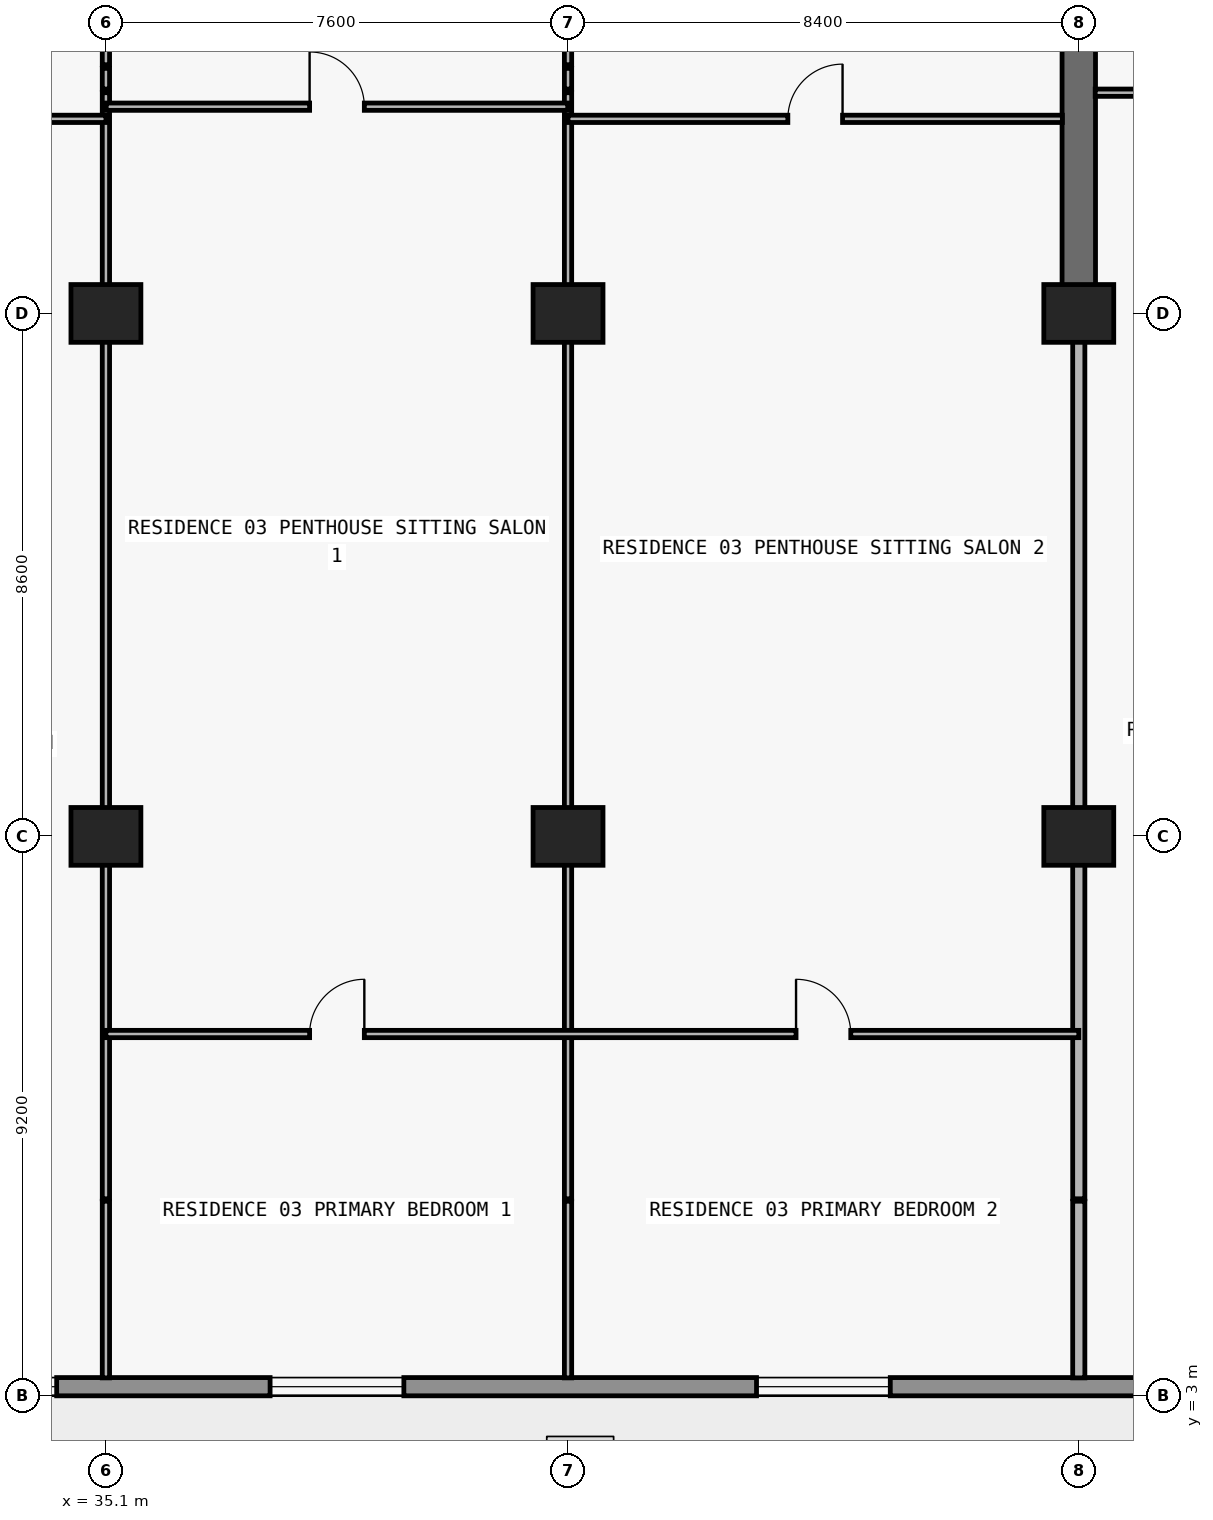
"""IFC4 building model, lengths in metres.
Left out: names, types, materials, properties, quantities, classifications, styles, units other than length and angle.
Written with IfcOpenShell. Run it as: python <this file> out.ifc"""

import sys

from ifc_helpers import new_model, si_unit, direction, frame, frame_2d, origin, origin_2d, place, context, subcontext, project, spatial, rectangle, extrude, element, fill, save


model = new_model("IFC4")
c1 = context("Model", 3, precision=1e-05, world=origin(), true_north=direction((0.0, 1.0)))
c2 = subcontext(c1, "Body", "Model", "MODEL_VIEW")
j1 = project(units=[si_unit("LENGTHUNIT", "METRE"), si_unit("PLANEANGLEUNIT", "RADIAN")], contexts=[c1])
p1 = place(None, origin())
s1 = spatial("IfcSite", under=j1, at=p1, CompositionType="ELEMENT")
p2 = place(p1, origin())
s2 = spatial("IfcBuilding", under=s1, at=p2, CompositionType="ELEMENT")
p3 = place(p2, frame((0.0, 0.0, 53.1)))
s3 = spatial("IfcBuildingStorey", under=s2, at=p3, CompositionType="ELEMENT", Elevation=53.1)
for number, where, z_axis, x_axis in (
    (1, (35.1, 12.2, 0.0), (0.0, 0.0, 1.0), (1.0, 0.0, 0.0)),
    (2, (42.7, 12.2, 0.0), (0.0, 0.0, 1.0), (1.0, 0.0, 0.0)),
    (3, (51.1, 12.2, 0.0), (0.0, 0.0, 1.0), (1.0, 0.0, 0.0)),
    (4, (35.1, 20.8, 0.0), (0.0, 0.0, 1.0), (1.0, 0.0, 0.0)),
    (5, (42.7, 20.8, 0.0), (0.0, 0.0, 1.0), (1.0, 0.0, 0.0)),
    (6, (51.1, 20.8, 0.0), (0.0, 0.0, 1.0), (1.0, 0.0, 0.0)),
):
    element("IfcColumn", number, at=place(p3, frame(where, z_axis=z_axis, x_axis=x_axis)), inside=s3, PredefinedType="COLUMN", context=c2, shape_type="SweptSolid", body=[
        extrude(rectangle(XDim=1.15, YDim=0.95, at=origin_2d()), origin(), (0.0, 0.0, 1.0), 3.05),
    ])
p4 = place(p3, frame((51.1, 20.8, 0.0), z_axis=(0.0, 0.0, 1.0), x_axis=(0.0, 1.0, 0.0)))
e7 = element("IfcWall", 7, at=p4, inside=s3, PredefinedType="SHEAR", context=c2, shape_type="SweptSolid", body=[
    extrude(rectangle(XDim=8.6, YDim=0.55, at=frame_2d((4.3, 0.0))), origin(), (0.0, 0.0, 1.0), 3.05),
])
p5 = place(p3, frame((72.7, 3.15, 0.0), z_axis=(0.0, 0.0, 1.0), x_axis=(-1.0, 0.0, 0.0)))
e8 = element("IfcWall", 8, at=p5, inside=s3, PredefinedType="STANDARD", context=c2, shape_type="SweptSolid", body=[
    extrude(rectangle(XDim=67.6, YDim=0.3, at=frame_2d((33.8, 0.0))), origin(), (0.0, 0.0, 1.0), 3.05),
])
p6 = place(p5, frame((59.826, 0.0, 0.0)))
e9 = element("IfcOpeningElement", 9, at=p6, cuts=e8, PredefinedType="OPENING", context=c2, shape_type="SweptSolid", body=[
    extrude(rectangle(XDim=2.0, YDim=2.3, at=frame_2d((1.0, 1.15))), frame((0.0, 0.16, 0.0), z_axis=(0.0, -1.0, 0.0), x_axis=(1.0, 0.0, 0.0)), (0.0, 0.0, 1.0), 0.32),
])
p7 = place(p5, frame((55.526, 0.0, 0.85)))
e10 = element("IfcOpeningElement", 10, at=p7, cuts=e8, PredefinedType="OPENING", context=c2, shape_type="SweptSolid", body=[
    extrude(rectangle(XDim=2.2, YDim=1.55, at=frame_2d((1.1, 0.775))), frame((0.0, 0.16, 0.0), z_axis=(0.0, -1.0, 0.0), x_axis=(1.0, 0.0, 0.0)), (0.0, 0.0, 1.0), 0.32),
])
p8 = place(p5, frame((51.09, 0.0, 0.0)))
e11 = element("IfcOpeningElement", 11, at=p8, cuts=e8, PredefinedType="OPENING", context=c2, shape_type="SweptSolid", body=[
    extrude(rectangle(XDim=2.0, YDim=2.3, at=frame_2d((1.0, 1.15))), frame((0.0, 0.16, 0.0), z_axis=(0.0, -1.0, 0.0), x_axis=(1.0, 0.0, 0.0)), (0.0, 0.0, 1.0), 0.32),
])
p9 = place(p5, frame((46.99, 0.0, 0.85)))
e12 = element("IfcOpeningElement", 12, at=p9, cuts=e8, PredefinedType="OPENING", context=c2, shape_type="SweptSolid", body=[
    extrude(rectangle(XDim=1.8, YDim=1.55, at=frame_2d((0.9, 0.775))), frame((0.0, 0.16, 0.0), z_axis=(0.0, -1.0, 0.0), x_axis=(1.0, 0.0, 0.0)), (0.0, 0.0, 1.0), 0.32),
])
p10 = place(p5, frame((43.09, 0.0, 0.0)))
e13 = element("IfcOpeningElement", 13, at=p10, cuts=e8, PredefinedType="OPENING", context=c2, shape_type="SweptSolid", body=[
    extrude(rectangle(XDim=2.0, YDim=2.3, at=frame_2d((1.0, 1.15))), frame((0.0, 0.16, 0.0), z_axis=(0.0, -1.0, 0.0), x_axis=(1.0, 0.0, 0.0)), (0.0, 0.0, 1.0), 0.32),
])
p11 = place(p5, frame((38.41, 0.0, 0.65)))
e14 = element("IfcOpeningElement", 14, at=p11, cuts=e8, PredefinedType="OPENING", context=c2, shape_type="SweptSolid", body=[
    extrude(rectangle(XDim=2.6, YDim=1.85, at=frame_2d((1.3, 0.925))), frame((0.0, 0.16, 0.0), z_axis=(0.0, -1.0, 0.0), x_axis=(1.0, 0.0, 0.0)), (0.0, 0.0, 1.0), 0.32),
])
p12 = place(p5, frame((32.7, 0.0, 0.85)))
e15 = element("IfcOpeningElement", 15, at=p12, cuts=e8, PredefinedType="OPENING", context=c2, shape_type="SweptSolid", body=[
    extrude(rectangle(XDim=2.2, YDim=1.55, at=frame_2d((1.1, 0.775))), frame((0.0, 0.16, 0.0), z_axis=(0.0, -1.0, 0.0), x_axis=(1.0, 0.0, 0.0)), (0.0, 0.0, 1.0), 0.32),
])
p13 = place(p5, frame((24.7, 0.0, 0.85)))
e16 = element("IfcOpeningElement", 16, at=p13, cuts=e8, PredefinedType="OPENING", context=c2, shape_type="SweptSolid", body=[
    extrude(rectangle(XDim=2.2, YDim=1.55, at=frame_2d((1.1, 0.775))), frame((0.0, 0.16, 0.0), z_axis=(0.0, -1.0, 0.0), x_axis=(1.0, 0.0, 0.0)), (0.0, 0.0, 1.0), 0.32),
])
p14 = place(p5, frame((18.29, 0.0, 0.0)))
e17 = element("IfcOpeningElement", 17, at=p14, cuts=e8, PredefinedType="OPENING", context=c2, shape_type="SweptSolid", body=[
    extrude(rectangle(XDim=2.0, YDim=2.3, at=frame_2d((1.0, 1.15))), frame((0.0, 0.16, 0.0), z_axis=(0.0, -1.0, 0.0), x_axis=(1.0, 0.0, 0.0)), (0.0, 0.0, 1.0), 0.32),
])
p15 = place(p5, frame((14.19, 0.0, 0.85)))
e18 = element("IfcOpeningElement", 18, at=p15, cuts=e8, PredefinedType="OPENING", context=c2, shape_type="SweptSolid", body=[
    extrude(rectangle(XDim=1.8, YDim=1.55, at=frame_2d((0.9, 0.775))), frame((0.0, 0.16, 0.0), z_axis=(0.0, -1.0, 0.0), x_axis=(1.0, 0.0, 0.0)), (0.0, 0.0, 1.0), 0.32),
])
p16 = place(p5, frame((10.226, 0.0, 0.0)))
e19 = element("IfcOpeningElement", 19, at=p16, cuts=e8, PredefinedType="OPENING", context=c2, shape_type="SweptSolid", body=[
    extrude(rectangle(XDim=2.0, YDim=2.3, at=frame_2d((1.0, 1.15))), frame((0.0, 0.16, 0.0), z_axis=(0.0, -1.0, 0.0), x_axis=(1.0, 0.0, 0.0)), (0.0, 0.0, 1.0), 0.32),
])
p17 = place(p5, frame((5.926, 0.0, 0.85)))
e20 = element("IfcOpeningElement", 20, at=p17, cuts=e8, PredefinedType="OPENING", context=c2, shape_type="SweptSolid", body=[
    extrude(rectangle(XDim=2.2, YDim=1.55, at=frame_2d((1.1, 0.775))), frame((0.0, 0.16, 0.0), z_axis=(0.0, -1.0, 0.0), x_axis=(1.0, 0.0, 0.0)), (0.0, 0.0, 1.0), 0.32),
])
p18 = place(p3, frame((35.1, 3.295, 0.0), z_axis=(0.0, 0.0, 1.0), x_axis=(0.0, 1.0, 0.0)))
e21 = element("IfcWall", 21, at=p18, inside=s3, PredefinedType="PARTITIONING", context=c2, shape_type="SweptSolid", body=[
    extrude(rectangle(XDim=2.905, YDim=0.12, at=frame_2d((1.453, 0.0))), origin(), (0.0, 0.0, 1.0), 3.05),
])
p19 = place(p3, frame((35.1, 6.24, 0.0), z_axis=(0.0, 0.0, 1.0), x_axis=(0.0, 1.0, 0.0)))
e22 = element("IfcWall", 22, at=p19, inside=s3, PredefinedType="PARTITIONING", context=c2, shape_type="SweptSolid", body=[
    extrude(rectangle(XDim=18.19, YDim=0.12, at=frame_2d((9.095, 0.0))), origin(), (0.0, 0.0, 1.0), 2.11),
])
p20 = place(p3, frame((35.1, 24.49, 0.0), z_axis=(0.0, 0.0, 1.0), x_axis=(0.0, 1.0, 0.0)))
e23 = element("IfcWall", 23, at=p20, inside=s3, PredefinedType="PARTITIONING", context=c2, shape_type="SweptSolid", body=[
    extrude(rectangle(XDim=0.34, YDim=0.12, at=frame_2d((0.17, 0.0))), origin(), (0.0, 0.0, 1.0), 2.11),
])
p21 = place(p3, frame((35.1, 24.89, 0.0), z_axis=(0.0, 0.0, 1.0), x_axis=(0.0, 1.0, 0.0)))
e24 = element("IfcWall", 24, at=p21, inside=s3, PredefinedType="PARTITIONING", context=c2, shape_type="SweptSolid", body=[
    extrude(rectangle(XDim=4.69, YDim=0.12, at=frame_2d((2.345, 0.0))), origin(), (0.0, 0.0, 1.0), 2.11),
])
p22 = place(p21, frame((1.405, 0.0, 0.0)))
e25 = element("IfcOpeningElement", 25, at=p22, cuts=e24, PredefinedType="OPENING", context=c2, shape_type="SweptSolid", body=[
    extrude(rectangle(XDim=0.9, YDim=2.06, at=frame_2d((0.45, 1.03))), frame((0.0, 0.07, 0.0), z_axis=(0.0, -1.0, 0.0), x_axis=(1.0, 0.0, 0.0)), (0.0, 0.0, 1.0), 0.14),
])
p23 = place(p3, frame((42.7, 3.295, 0.0), z_axis=(0.0, 0.0, 1.0), x_axis=(0.0, 1.0, 0.0)))
e26 = element("IfcWall", 26, at=p23, inside=s3, PredefinedType="PARTITIONING", context=c2, shape_type="SweptSolid", body=[
    extrude(rectangle(XDim=2.905, YDim=0.12, at=frame_2d((1.453, 0.0))), origin(), (0.0, 0.0, 1.0), 3.05),
])
p24 = place(p3, frame((42.7, 6.24, 0.0), z_axis=(0.0, 0.0, 1.0), x_axis=(0.0, 1.0, 0.0)))
e27 = element("IfcWall", 27, at=p24, inside=s3, PredefinedType="PARTITIONING", context=c2, shape_type="SweptSolid", body=[
    extrude(rectangle(XDim=18.19, YDim=0.12, at=frame_2d((9.095, 0.0))), origin(), (0.0, 0.0, 1.0), 2.11),
])
p25 = place(p3, frame((42.7, 24.49, 0.0), z_axis=(0.0, 0.0, 1.0), x_axis=(0.0, 1.0, 0.0)))
e28 = element("IfcWall", 28, at=p25, inside=s3, PredefinedType="PARTITIONING", context=c2, shape_type="SweptSolid", body=[
    extrude(rectangle(XDim=0.34, YDim=0.12, at=frame_2d((0.17, 0.0))), origin(), (0.0, 0.0, 1.0), 2.11),
])
p26 = place(p3, frame((42.7, 24.89, 0.0), z_axis=(0.0, 0.0, 1.0), x_axis=(0.0, 1.0, 0.0)))
e29 = element("IfcWall", 29, at=p26, inside=s3, PredefinedType="PARTITIONING", context=c2, shape_type="SweptSolid", body=[
    extrude(rectangle(XDim=4.69, YDim=0.12, at=frame_2d((2.345, 0.0))), origin(), (0.0, 0.0, 1.0), 2.11),
])
p27 = place(p26, frame((1.405, 0.0, 0.0)))
e30 = element("IfcOpeningElement", 30, at=p27, cuts=e29, PredefinedType="OPENING", context=c2, shape_type="SweptSolid", body=[
    extrude(rectangle(XDim=0.9, YDim=2.06, at=frame_2d((0.45, 1.03))), frame((0.0, 0.07, 0.0), z_axis=(0.0, -1.0, 0.0), x_axis=(1.0, 0.0, 0.0)), (0.0, 0.0, 1.0), 0.14),
])
p28 = place(p3, frame((51.1, 3.295, 0.0), z_axis=(0.0, 0.0, 1.0), x_axis=(0.0, 1.0, 0.0)))
e31 = element("IfcWall", 31, at=p28, inside=s3, PredefinedType="PARTITIONING", context=c2, shape_type="SweptSolid", body=[
    extrude(rectangle(XDim=2.905, YDim=0.2, at=frame_2d((1.453, 0.0))), origin(), (0.0, 0.0, 1.0), 3.05),
])
p29 = place(p3, frame((51.1, 6.24, 0.0), z_axis=(0.0, 0.0, 1.0), x_axis=(0.0, 1.0, 0.0)))
e32 = element("IfcWall", 32, at=p29, inside=s3, PredefinedType="PARTITIONING", context=c2, shape_type="SweptSolid", body=[
    extrude(rectangle(XDim=14.555, YDim=0.2, at=frame_2d((7.277, 0.0))), origin(), (0.0, 0.0, 1.0), 2.11),
])
p30 = place(p3, frame((35.1, 8.95, 0.0), z_axis=(0.0, 0.0, 1.0), x_axis=(1.0, 0.0, 0.0)))
e33 = element("IfcWall", 33, at=p30, inside=s3, PredefinedType="PARTITIONING", context=c2, shape_type="SweptSolid", body=[
    extrude(rectangle(XDim=16.0, YDim=0.12, at=frame_2d((8.0, 0.0))), origin(), (0.0, 0.0, 1.0), 3.05),
])
p31 = place(p30, frame((3.35, 0.0, 0.0)))
e34 = element("IfcOpeningElement", 34, at=p31, cuts=e33, PredefinedType="OPENING", context=c2, shape_type="SweptSolid", body=[
    extrude(rectangle(XDim=0.9, YDim=2.15, at=frame_2d((0.45, 1.075))), frame((0.0, 0.07, 0.0), z_axis=(0.0, -1.0, 0.0), x_axis=(1.0, 0.0, 0.0)), (0.0, 0.0, 1.0), 0.14),
])
p32 = place(p30, frame((11.35, 0.0, 0.0)))
e35 = element("IfcOpeningElement", 35, at=p32, cuts=e33, PredefinedType="OPENING", context=c2, shape_type="SweptSolid", body=[
    extrude(rectangle(XDim=0.9, YDim=2.15, at=frame_2d((0.45, 1.075))), frame((0.0, 0.07, 0.0), z_axis=(0.0, -1.0, 0.0), x_axis=(1.0, 0.0, 0.0)), (0.0, 0.0, 1.0), 0.14),
])
p33 = place(p3, frame((26.97, 24.0, 0.0), z_axis=(0.0, 0.0, 1.0), x_axis=(1.0, 0.0, 0.0)))
e36 = element("IfcWall", 36, at=p33, inside=s3, PredefinedType="PARTITIONING", context=c2, shape_type="SweptSolid", body=[
    extrude(rectangle(XDim=8.13, YDim=0.12, at=frame_2d((4.065, 0.0))), origin(), (0.0, 0.0, 1.0), 3.05),
])
p34 = place(p33, frame((1.305, 0.0, 0.0)))
e37 = element("IfcOpeningElement", 37, at=p34, cuts=e36, PredefinedType="OPENING", context=c2, shape_type="SweptSolid", body=[
    extrude(rectangle(XDim=0.9, YDim=2.15, at=frame_2d((0.45, 1.075))), frame((0.0, 0.07, 0.0), z_axis=(0.0, -1.0, 0.0), x_axis=(1.0, 0.0, 0.0)), (0.0, 0.0, 1.0), 0.14),
])
p35 = place(p3, frame((42.7, 24.0, 0.0), z_axis=(0.0, 0.0, 1.0), x_axis=(1.0, 0.0, 0.0)))
e38 = element("IfcWall", 38, at=p35, inside=s3, PredefinedType="PARTITIONING", context=c2, shape_type="SweptSolid", body=[
    extrude(rectangle(XDim=8.13, YDim=0.12, at=frame_2d((4.065, 0.0))), origin(), (0.0, 0.0, 1.0), 3.05),
])
p36 = place(p35, frame((3.615, 0.0, 0.0)))
e39 = element("IfcOpeningElement", 39, at=p36, cuts=e38, PredefinedType="OPENING", context=c2, shape_type="SweptSolid", body=[
    extrude(rectangle(XDim=0.9, YDim=2.15, at=frame_2d((0.45, 1.075))), frame((0.0, 0.07, 0.0), z_axis=(0.0, -1.0, 0.0), x_axis=(1.0, 0.0, 0.0)), (0.0, 0.0, 1.0), 0.14),
])
p37 = place(p3, frame((35.105, 24.2, 0.0), z_axis=(0.0, 0.0, 1.0), x_axis=(1.0, 0.0, 0.0)))
e40 = element("IfcWall", 40, at=p37, inside=s3, PredefinedType="PARTITIONING", context=c2, shape_type="SweptSolid", body=[
    extrude(rectangle(XDim=7.59, YDim=0.12, at=frame_2d((3.795, 0.0))), origin(), (0.0, 0.0, 1.0), 3.05),
])
p38 = place(p37, frame((3.345, 0.0, 0.0)))
e41 = element("IfcOpeningElement", 41, at=p38, cuts=e40, PredefinedType="OPENING", context=c2, shape_type="SweptSolid", body=[
    extrude(rectangle(XDim=0.9, YDim=2.15, at=frame_2d((0.45, 1.075))), frame((0.0, 0.07, 0.0), z_axis=(0.0, -1.0, 0.0), x_axis=(1.0, 0.0, 0.0)), (0.0, 0.0, 1.0), 0.14),
])
p39 = place(p3, frame((51.37, 24.43, 0.0), z_axis=(0.0, 0.0, 1.0), x_axis=(1.0, 0.0, 0.0)))
e42 = element("IfcWall", 42, at=p39, inside=s3, PredefinedType="PARTITIONING", context=c2, shape_type="SweptSolid", body=[
    extrude(rectangle(XDim=8.13, YDim=0.12, at=frame_2d((4.065, 0.0))), origin(), (0.0, 0.0, 1.0), 3.05),
])
p40 = place(p39, frame((1.558, 0.0, 0.0)))
e43 = element("IfcOpeningElement", 43, at=p40, cuts=e42, PredefinedType="OPENING", context=c2, shape_type="SweptSolid", body=[
    extrude(rectangle(XDim=0.9, YDim=2.15, at=frame_2d((0.45, 1.075))), frame((0.0, 0.07, 0.0), z_axis=(0.0, -1.0, 0.0), x_axis=(1.0, 0.0, 0.0)), (0.0, 0.0, 1.0), 0.14),
])
p41 = place(p39, frame((5.79, 0.0, 0.0)))
e44 = element("IfcOpeningElement", 44, at=p41, cuts=e42, PredefinedType="OPENING", context=c2, shape_type="SweptSolid", body=[
    extrude(rectangle(XDim=0.9, YDim=2.15, at=frame_2d((0.45, 1.075))), frame((0.0, 0.07, 0.0), z_axis=(0.0, -1.0, 0.0), x_axis=(1.0, 0.0, 0.0)), (0.0, 0.0, 1.0), 0.14),
])
p42 = place(p11, origin())
e45 = element("IfcWindow", 45, at=p42, inside=s3, PartitioningType="SINGLE_PANEL", PredefinedType="WINDOW", context=c2, shape_type="SweptSolid", body=[
    extrude(rectangle(XDim=2.6, YDim=1.85, at=frame_2d((1.3, 0.925))), frame((0.0, 0.03, 0.0), z_axis=(0.0, -1.0, 0.0), x_axis=(1.0, 0.0, 0.0)), (0.0, 0.0, 1.0), 0.06),
])
fill(e14, e45)
p43 = place(p12, origin())
e46 = element("IfcWindow", 46, at=p43, inside=s3, PartitioningType="SINGLE_PANEL", PredefinedType="WINDOW", context=c2, shape_type="SweptSolid", body=[
    extrude(rectangle(XDim=2.2, YDim=1.55, at=frame_2d((1.1, 0.775))), frame((0.0, 0.03, 0.0), z_axis=(0.0, -1.0, 0.0), x_axis=(1.0, 0.0, 0.0)), (0.0, 0.0, 1.0), 0.06),
])
fill(e15, e46)
p44 = place(p13, origin())
e47 = element("IfcWindow", 47, at=p44, inside=s3, PartitioningType="SINGLE_PANEL", PredefinedType="WINDOW", context=c2, shape_type="SweptSolid", body=[
    extrude(rectangle(XDim=2.2, YDim=1.55, at=frame_2d((1.1, 0.775))), frame((0.0, 0.03, 0.0), z_axis=(0.0, -1.0, 0.0), x_axis=(1.0, 0.0, 0.0)), (0.0, 0.0, 1.0), 0.06),
])
fill(e16, e47)
p45 = place(p38, origin())
e48 = element("IfcDoor", 48, at=p45, inside=s3, OperationType="SINGLE_SWING_LEFT", PredefinedType="DOOR", context=c2, shape_type="SweptSolid", body=[
    extrude(rectangle(XDim=0.9, YDim=2.15, at=frame_2d((0.45, 1.075))), frame((0.0, 0.025, 0.0), z_axis=(0.0, -1.0, 0.0), x_axis=(1.0, 0.0, 0.0)), (0.0, 0.0, 1.0), 0.05),
])
fill(e41, e48)
p46 = place(p31, origin())
e49 = element("IfcDoor", 49, at=p46, inside=s3, OperationType="SINGLE_SWING_RIGHT", PredefinedType="DOOR", context=c2, shape_type="SweptSolid", body=[
    extrude(rectangle(XDim=0.9, YDim=2.15, at=frame_2d((0.45, 1.075))), frame((0.0, 0.025, 0.0), z_axis=(0.0, -1.0, 0.0), x_axis=(1.0, 0.0, 0.0)), (0.0, 0.0, 1.0), 0.05),
])
fill(e34, e49)
p47 = place(p36, origin())
e50 = element("IfcDoor", 50, at=p47, inside=s3, OperationType="SINGLE_SWING_RIGHT", PredefinedType="DOOR", context=c2, shape_type="SweptSolid", body=[
    extrude(rectangle(XDim=0.9, YDim=2.15, at=frame_2d((0.45, 1.075))), frame((0.0, 0.025, 0.0), z_axis=(0.0, -1.0, 0.0), x_axis=(1.0, 0.0, 0.0)), (0.0, 0.0, 1.0), 0.05),
])
fill(e39, e50)
p48 = place(p32, origin())
e51 = element("IfcDoor", 51, at=p48, inside=s3, OperationType="SINGLE_SWING_LEFT", PredefinedType="DOOR", context=c2, shape_type="SweptSolid", body=[
    extrude(rectangle(XDim=0.9, YDim=2.15, at=frame_2d((0.45, 1.075))), frame((0.0, 0.025, 0.0), z_axis=(0.0, -1.0, 0.0), x_axis=(1.0, 0.0, 0.0)), (0.0, 0.0, 1.0), 0.05),
])
fill(e35, e51)
save(model, sys.argv[1])
